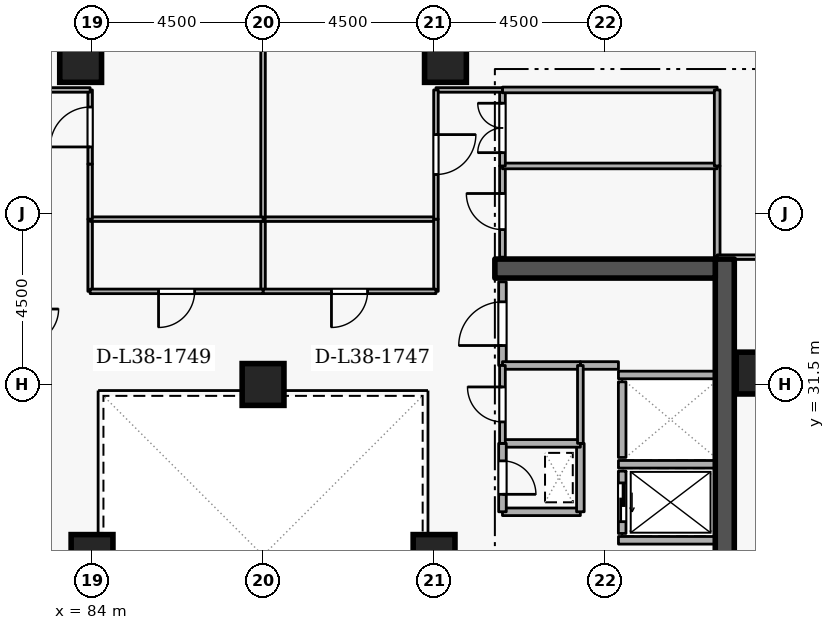
"""IFC4 building model, lengths in metres.
Left out: names, types, materials, properties, quantities, classifications, styles, units other than length and angle.
Written with IfcOpenShell. Run it as: python <this file> out.ifc"""

import sys

from ifc_helpers import new_model, si_unit, direction, frame, frame_2d, origin, origin_2d, place, context, subcontext, project, spatial, rectangle, extrude, element, fill, save


model = new_model("IFC4")
c1 = context("Model", 3, precision=1e-05, world=origin(), true_north=direction((0.0, 1.0)))
c2 = subcontext(c1, "Body", "Model", "MODEL_VIEW")
j1 = project(units=[si_unit("LENGTHUNIT", "METRE"), si_unit("PLANEANGLEUNIT", "RADIAN")], contexts=[c1])
p1 = place(None, origin())
s1 = spatial("IfcSite", under=j1, at=p1, CompositionType="ELEMENT")
p2 = place(p1, origin())
s2 = spatial("IfcBuilding", under=s1, at=p2, CompositionType="ELEMENT")
p3 = place(p2, frame((0.0, 0.0, 145.5)))
s3 = spatial("IfcBuildingStorey", under=s2, at=p3, CompositionType="ELEMENT", Elevation=145.5)
p4 = place(p3, frame((100.65, 19.2, 0.0), z_axis=(0.0, 0.0, 1.0), x_axis=(0.0, 1.0, 0.0)))
e1 = element("IfcWall", 1, at=p4, inside=s3, PredefinedType="SHEAR", context=c2, shape_type="SweptSolid", body=[
    extrude(rectangle(XDim=15.6, YDim=0.5, at=frame_2d((7.8, 0.0))), origin(), (0.0, 0.0, 1.0), 3.6),
])
p5 = place(p3, frame((94.6, 34.55, 0.0), z_axis=(0.0, 0.0, 1.0), x_axis=(1.0, 0.0, 0.0)))
e2 = element("IfcWall", 2, at=p5, inside=s3, PredefinedType="SHEAR", context=c2, shape_type="SweptSolid", body=[
    extrude(rectangle(XDim=5.8, YDim=0.5, at=frame_2d((2.9, 0.0))), origin(), (0.0, 0.0, 1.0), 3.6),
])
for number, where, z_axis, x_axis in (
    (3, (93.3, 40.0, 0.0), (0.0, 0.0, 1.0), (1.0, 0.0, 0.0)),
    (4, (83.7, 40.0, 0.0), (0.0, 0.0, 1.0), (1.0, 0.0, 0.0)),
    (5, (101.5, 31.8, 0.0), (0.0, 0.0, 1.0), (1.0, 0.0, 0.0)),
    (6, (93.0, 27.0, 0.0), (0.0, 0.0, 1.0), (1.0, 0.0, 0.0)),
    (7, (84.0, 27.0, 0.0), (0.0, 0.0, 1.0), (1.0, 0.0, 0.0)),
    (8, (88.5, 31.5, 0.0), (0.0, 0.0, 1.0), (1.0, 0.0, 0.0)),
):
    element("IfcColumn", number, at=place(p3, frame(where, z_axis=z_axis, x_axis=x_axis)), inside=s3, PredefinedType="COLUMN", context=c2, shape_type="SweptSolid", body=[
        extrude(rectangle(XDim=1.1, YDim=1.1, at=origin_2d()), origin(), (0.0, 0.0, 1.0), 3.6),
    ])
p6 = place(p3, frame((97.95, 29.22, 0.0), z_axis=(0.0, 0.0, 1.0), x_axis=(0.0, -1.0, 0.0)))
e9 = element("IfcWall", 9, at=p6, inside=s3, PredefinedType="STANDARD", context=c2, shape_type="SweptSolid", body=[
    extrude(rectangle(XDim=1.64, YDim=0.2, at=frame_2d((0.82, 0.0))), origin(), (0.0, 0.0, 1.0), 3.3),
])
p7 = place(p6, frame((0.31, 0.0, 0.0)))
e10 = element("IfcOpeningElement", 10, at=p7, cuts=e9, PredefinedType="OPENING", context=c2, shape_type="SweptSolid", body=[
    extrude(rectangle(XDim=1.02, YDim=2.06, at=frame_2d((0.51, 1.03))), frame((0.0, 0.11, 0.0), z_axis=(0.0, -1.0, 0.0), x_axis=(1.0, 0.0, 0.0)), (0.0, 0.0, 1.0), 0.22),
])
p8 = place(p3, frame((97.95, 31.57, 0.0), z_axis=(0.0, 0.0, 1.0), x_axis=(0.0, -1.0, 0.0)))
e11 = element("IfcWall", 11, at=p8, inside=s3, PredefinedType="STANDARD", context=c2, shape_type="SweptSolid", body=[
    extrude(rectangle(XDim=1.99, YDim=0.2, at=frame_2d((0.995, 0.0))), origin(), (0.0, 0.0, 1.0), 3.3),
])
p9 = place(p3, frame((97.852, 29.4, 0.0), z_axis=(0.0, 0.0, 1.0), x_axis=(1.0, 0.0, 0.0)))
e12 = element("IfcWall", 12, at=p9, inside=s3, PredefinedType="STANDARD", context=c2, shape_type="SweptSolid", body=[
    extrude(rectangle(XDim=2.536, YDim=0.2, at=frame_2d((1.268, 0.0))), origin(), (0.0, 0.0, 1.0), 3.3),
])
p10 = place(p3, frame((97.852, 27.4, 0.0), z_axis=(0.0, 0.0, 1.0), x_axis=(1.0, 0.0, 0.0)))
e13 = element("IfcWall", 13, at=p10, inside=s3, PredefinedType="STANDARD", context=c2, shape_type="SweptSolid", body=[
    extrude(rectangle(XDim=2.536, YDim=0.2, at=frame_2d((1.268, 0.0))), origin(), (0.0, 0.0, 1.0), 1.685),
])
p11 = place(p3, frame((97.852, 31.75, 0.0), z_axis=(0.0, 0.0, 1.0), x_axis=(1.0, 0.0, 0.0)))
e14 = element("IfcWall", 14, at=p11, inside=s3, PredefinedType="STANDARD", context=c2, shape_type="SweptSolid", body=[
    extrude(rectangle(XDim=2.536, YDim=0.2, at=frame_2d((1.268, 0.0))), origin(), (0.0, 0.0, 1.0), 3.3),
])
p12 = place(p3, frame((94.8, 28.15, 0.0), z_axis=(0.0, 0.0, 1.0), x_axis=(1.0, 0.0, 0.0)))
e15 = element("IfcWall", 15, at=p12, inside=s3, PredefinedType="STANDARD", context=c2, shape_type="SweptSolid", body=[
    extrude(rectangle(XDim=2.05, YDim=0.2, at=frame_2d((1.025, 0.0))), origin(), (0.0, 0.0, 1.0), 3.3),
])
p13 = place(p3, frame((96.85, 28.15, 0.0), z_axis=(0.0, 0.0, 1.0), x_axis=(0.0, 1.0, 0.0)))
e16 = element("IfcWall", 16, at=p13, inside=s3, PredefinedType="STANDARD", context=c2, shape_type="SweptSolid", body=[
    extrude(rectangle(XDim=1.8, YDim=0.2, at=frame_2d((0.9, 0.0))), origin(), (0.0, 0.0, 1.0), 3.3),
])
p14 = place(p3, frame((96.85, 29.95, 0.0), z_axis=(0.0, 0.0, 1.0), x_axis=(-1.0, 0.0, 0.0)))
e17 = element("IfcWall", 17, at=p14, inside=s3, PredefinedType="STANDARD", context=c2, shape_type="SweptSolid", body=[
    extrude(rectangle(XDim=2.05, YDim=0.2, at=frame_2d((1.025, 0.0))), origin(), (0.0, 0.0, 1.0), 3.3),
])
p15 = place(p3, frame((94.8, 29.95, 0.0), z_axis=(0.0, 0.0, 1.0), x_axis=(0.0, -1.0, 0.0)))
e18 = element("IfcWall", 18, at=p15, inside=s3, PredefinedType="STANDARD", context=c2, shape_type="SweptSolid", body=[
    extrude(rectangle(XDim=1.8, YDim=0.2, at=frame_2d((0.9, 0.0))), origin(), (0.0, 0.0, 1.0), 3.3),
])
p16 = place(p15, frame((0.46, 0.0, 0.0)))
e19 = element("IfcOpeningElement", 19, at=p16, cuts=e18, PredefinedType="OPENING", context=c2, shape_type="SweptSolid", body=[
    extrude(rectangle(XDim=0.88, YDim=2.04, at=frame_2d((0.44, 1.02))), frame((0.0, 0.11, 0.0), z_axis=(0.0, -1.0, 0.0), x_axis=(1.0, 0.0, 0.0)), (0.0, 0.0, 1.0), 0.22),
])
p17 = place(p3, frame((94.8, 32.0, 0.0), z_axis=(0.0, 0.0, 1.0), x_axis=(0.0, 1.0, 0.0)))
e20 = element("IfcWall", 20, at=p17, inside=s3, PredefinedType="STANDARD", context=c2, shape_type="SweptSolid", body=[
    extrude(rectangle(XDim=2.2, YDim=0.2, at=frame_2d((1.1, 0.0))), origin(), (0.0, 0.0, 1.0), 3.3),
])
p18 = place(p17, frame((0.525, 0.0, 0.0)))
e21 = element("IfcOpeningElement", 21, at=p18, cuts=e20, PredefinedType="OPENING", context=c2, shape_type="SweptSolid", body=[
    extrude(rectangle(XDim=1.15, YDim=2.1, at=frame_2d((0.575, 1.05))), frame((0.0, 0.11, 0.0), z_axis=(0.0, -1.0, 0.0), x_axis=(1.0, 0.0, 0.0)), (0.0, 0.0, 1.0), 0.22),
])
p19 = place(p3, frame((97.852, 32.0, 0.0), z_axis=(0.0, 0.0, 1.0), x_axis=(-1.0, 0.0, 0.0)))
e22 = element("IfcWall", 22, at=p19, inside=s3, PredefinedType="STANDARD", context=c2, shape_type="SweptSolid", body=[
    extrude(rectangle(XDim=1.002, YDim=0.2, at=frame_2d((0.501, 0.0))), origin(), (0.0, 0.0, 1.0), 3.3),
])
p20 = place(p3, frame((96.85, 32.0, 0.0), z_axis=(0.0, 0.0, 1.0), x_axis=(-1.0, 0.0, 0.0)))
e23 = element("IfcWall", 23, at=p20, inside=s3, PredefinedType="STANDARD", context=c2, shape_type="SweptSolid", body=[
    extrude(rectangle(XDim=2.05, YDim=0.2, at=frame_2d((1.025, 0.0))), origin(), (0.0, 0.0, 1.0), 3.3),
])
p21 = place(p3, frame((94.8, 29.95, 0.0), z_axis=(0.0, 0.0, 1.0), x_axis=(0.0, 1.0, 0.0)))
e24 = element("IfcWall", 24, at=p21, inside=s3, PredefinedType="PARTITIONING", context=c2, shape_type="SweptSolid", body=[
    extrude(rectangle(XDim=2.05, YDim=0.15, at=frame_2d((1.025, 0.0))), origin(), (0.0, 0.0, 1.0), 3.3),
])
p22 = place(p21, frame((0.565, 0.0, 0.0)))
e25 = element("IfcOpeningElement", 25, at=p22, cuts=e24, PredefinedType="OPENING", context=c2, shape_type="SweptSolid", body=[
    extrude(rectangle(XDim=0.92, YDim=2.08, at=frame_2d((0.46, 1.04))), frame((0.0, 0.085, 0.0), z_axis=(0.0, -1.0, 0.0), x_axis=(1.0, 0.0, 0.0)), (0.0, 0.0, 1.0), 0.17),
])
p23 = place(p3, frame((96.85, 32.0, 0.0), z_axis=(0.0, 0.0, 1.0), x_axis=(0.0, -1.0, 0.0)))
e26 = element("IfcWall", 26, at=p23, inside=s3, PredefinedType="PARTITIONING", context=c2, shape_type="SweptSolid", body=[
    extrude(rectangle(XDim=2.05, YDim=0.15, at=frame_2d((1.025, 0.0))), origin(), (0.0, 0.0, 1.0), 3.3),
])
p24 = place(p3, frame((100.45, 37.25, 0.0), z_axis=(0.0, 0.0, 1.0), x_axis=(0.0, -1.0, 0.0)))
e27 = element("IfcWall", 27, at=p24, inside=s3, PredefinedType="PARTITIONING", context=c2, shape_type="SweptSolid", body=[
    extrude(rectangle(XDim=2.4, YDim=0.15, at=frame_2d((1.2, 0.0))), origin(), (0.0, 0.0, 1.0), 3.3),
])
p25 = place(p3, frame((94.8, 34.85, 0.0), z_axis=(0.0, 0.0, 1.0), x_axis=(0.0, 1.0, 0.0)))
e28 = element("IfcWall", 28, at=p25, inside=s3, PredefinedType="PARTITIONING", context=c2, shape_type="SweptSolid", body=[
    extrude(rectangle(XDim=2.4, YDim=0.15, at=frame_2d((1.2, 0.0))), origin(), (0.0, 0.0, 1.0), 3.3),
])
p26 = place(p25, frame((0.725, 0.0, 0.0)))
e29 = element("IfcOpeningElement", 29, at=p26, cuts=e28, PredefinedType="OPENING", context=c2, shape_type="SweptSolid", body=[
    extrude(rectangle(XDim=0.95, YDim=2.1, at=frame_2d((0.475, 1.05))), frame((0.0, 0.085, 0.0), z_axis=(0.0, -1.0, 0.0), x_axis=(1.0, 0.0, 0.0)), (0.0, 0.0, 1.0), 0.17),
])
p27 = place(p3, frame((94.8, 37.25, 0.0), z_axis=(0.0, 0.0, 1.0), x_axis=(1.0, 0.0, 0.0)))
e30 = element("IfcWall", 30, at=p27, inside=s3, PredefinedType="PARTITIONING", context=c2, shape_type="SweptSolid", body=[
    extrude(rectangle(XDim=5.65, YDim=0.15, at=frame_2d((2.825, 0.0))), origin(), (0.0, 0.0, 1.0), 3.3),
])
p28 = place(p3, frame((94.8, 37.25, 0.0), z_axis=(0.0, 0.0, 1.0), x_axis=(0.0, 1.0, 0.0)))
e31 = element("IfcWall", 31, at=p28, inside=s3, PredefinedType="PARTITIONING", context=c2, shape_type="SweptSolid", body=[
    extrude(rectangle(XDim=2.0, YDim=0.15, at=frame_2d((1.0, 0.0))), origin(), (0.0, 0.0, 1.0), 3.3),
])
p29 = place(p28, frame((0.35, 0.0, 0.0)))
e32 = element("IfcOpeningElement", 32, at=p29, cuts=e31, PredefinedType="OPENING", context=c2, shape_type="SweptSolid", body=[
    extrude(rectangle(XDim=1.3, YDim=2.12, at=frame_2d((0.65, 1.06))), frame((0.0, 0.085, 0.0), z_axis=(0.0, -1.0, 0.0), x_axis=(1.0, 0.0, 0.0)), (0.0, 0.0, 1.0), 0.17),
])
p30 = place(p3, frame((94.8, 39.25, 0.0), z_axis=(0.0, 0.0, 1.0), x_axis=(1.0, 0.0, 0.0)))
e33 = element("IfcWall", 33, at=p30, inside=s3, PredefinedType="PARTITIONING", context=c2, shape_type="SweptSolid", body=[
    extrude(rectangle(XDim=5.65, YDim=0.15, at=frame_2d((2.825, 0.0))), origin(), (0.0, 0.0, 1.0), 3.3),
])
p31 = place(p3, frame((100.45, 39.25, 0.0), z_axis=(0.0, 0.0, 1.0), x_axis=(0.0, -1.0, 0.0)))
e34 = element("IfcWall", 34, at=p31, inside=s3, PredefinedType="PARTITIONING", context=c2, shape_type="SweptSolid", body=[
    extrude(rectangle(XDim=2.0, YDim=0.15, at=frame_2d((1.0, 0.0))), origin(), (0.0, 0.0, 1.0), 3.3),
])
p32 = place(p3, frame((88.5, 33.95, 0.0), z_axis=(0.0, 0.0, 1.0), x_axis=(0.0, 1.0, 0.0)))
e35 = element("IfcWall", 35, at=p32, inside=s3, PredefinedType="PARTITIONING", context=c2, shape_type="SweptSolid", body=[
    extrude(rectangle(XDim=1.9, YDim=0.12, at=frame_2d((0.95, 0.0))), origin(), (0.0, 0.0, 1.0), 1.685),
])
p33 = place(p3, frame((88.5, 35.85, 0.0), z_axis=(0.0, 0.0, 1.0), x_axis=(1.0, 0.0, 0.0)))
e36 = element("IfcWall", 36, at=p33, inside=s3, PredefinedType="PARTITIONING", context=c2, shape_type="SweptSolid", body=[
    extrude(rectangle(XDim=4.55, YDim=0.12, at=frame_2d((2.275, 0.0))), origin(), (0.0, 0.0, 1.0), 3.3),
])
p34 = place(p3, frame((93.05, 35.85, 0.0), z_axis=(0.0, 0.0, 1.0), x_axis=(0.0, -1.0, 0.0)))
e37 = element("IfcWall", 37, at=p34, inside=s3, PredefinedType="PARTITIONING", context=c2, shape_type="SweptSolid", body=[
    extrude(rectangle(XDim=1.9, YDim=0.12, at=frame_2d((0.95, 0.0))), origin(), (0.0, 0.0, 1.0), 3.3),
])
p35 = place(p3, frame((93.05, 33.95, 0.0), z_axis=(0.0, 0.0, 1.0), x_axis=(-1.0, 0.0, 0.0)))
e38 = element("IfcWall", 38, at=p35, inside=s3, PredefinedType="PARTITIONING", context=c2, shape_type="SweptSolid", body=[
    extrude(rectangle(XDim=4.55, YDim=0.12, at=frame_2d((2.275, 0.0))), origin(), (0.0, 0.0, 1.0), 3.3),
])
p36 = place(p35, frame((1.8, 0.0, 0.0)))
e39 = element("IfcOpeningElement", 39, at=p36, cuts=e38, PredefinedType="OPENING", context=c2, shape_type="SweptSolid", body=[
    extrude(rectangle(XDim=0.95, YDim=2.1, at=frame_2d((0.475, 1.05))), frame((0.0, 0.07, 0.0), z_axis=(0.0, -1.0, 0.0), x_axis=(1.0, 0.0, 0.0)), (0.0, 0.0, 1.0), 0.14),
])
p37 = place(p3, frame((94.8, 39.25, 0.0), z_axis=(0.0, 0.0, 1.0), x_axis=(-1.0, 0.0, 0.0)))
e40 = element("IfcWall", 40, at=p37, inside=s3, PredefinedType="PARTITIONING", context=c2, shape_type="SweptSolid", body=[
    extrude(rectangle(XDim=1.75, YDim=0.12, at=frame_2d((0.875, 0.0))), origin(), (0.0, 0.0, 1.0), 3.3),
])
p38 = place(p3, frame((93.05, 39.25, 0.0), z_axis=(0.0, 0.0, 1.0), x_axis=(0.0, -1.0, 0.0)))
e41 = element("IfcWall", 41, at=p38, inside=s3, PredefinedType="PARTITIONING", context=c2, shape_type="SweptSolid", body=[
    extrude(rectangle(XDim=3.4, YDim=0.12, at=frame_2d((1.7, 0.0))), origin(), (0.0, 0.0, 1.0), 3.3),
])
p39 = place(p38, frame((1.175, 0.0, 0.0)))
e42 = element("IfcOpeningElement", 42, at=p39, cuts=e41, PredefinedType="OPENING", context=c2, shape_type="SweptSolid", body=[
    extrude(rectangle(XDim=1.05, YDim=2.1, at=frame_2d((0.525, 1.05))), frame((0.0, 0.07, 0.0), z_axis=(0.0, -1.0, 0.0), x_axis=(1.0, 0.0, 0.0)), (0.0, 0.0, 1.0), 0.14),
])
p40 = place(p3, frame((88.5, 35.85, 0.0), z_axis=(0.0, 0.0, 1.0), x_axis=(0.0, 1.0, 0.0)))
e43 = element("IfcWall", 43, at=p40, inside=s3, PredefinedType="PARTITIONING", context=c2, shape_type="SweptSolid", body=[
    extrude(rectangle(XDim=8.87, YDim=0.12, at=frame_2d((4.435, 0.0))), origin(), (0.0, 0.0, 1.0), 1.685),
])
p41 = place(p3, frame((112.22, 34.85, 0.0), z_axis=(0.0, 0.0, 1.0), x_axis=(-1.0, 0.0, 0.0)))
e44 = element("IfcWall", 44, at=p41, inside=s3, PredefinedType="PARTITIONING", context=c2, shape_type="SweptSolid", body=[
    extrude(rectangle(XDim=11.77, YDim=0.12, at=frame_2d((5.885, 0.0))), origin(), (0.0, 0.0, 1.0), 2.505),
])
p42 = place(p3, frame((83.95, 33.95, 0.0), z_axis=(0.0, 0.0, 1.0), x_axis=(0.0, 1.0, 0.0)))
e45 = element("IfcWall", 45, at=p42, inside=s3, PredefinedType="PARTITIONING", context=c2, shape_type="SweptSolid", body=[
    extrude(rectangle(XDim=1.9, YDim=0.12, at=frame_2d((0.95, 0.0))), origin(), (0.0, 0.0, 1.0), 3.3),
])
p43 = place(p3, frame((83.95, 35.85, 0.0), z_axis=(0.0, 0.0, 1.0), x_axis=(1.0, 0.0, 0.0)))
e46 = element("IfcWall", 46, at=p43, inside=s3, PredefinedType="PARTITIONING", context=c2, shape_type="SweptSolid", body=[
    extrude(rectangle(XDim=4.55, YDim=0.12, at=frame_2d((2.275, 0.0))), origin(), (0.0, 0.0, 1.0), 3.3),
])
p44 = place(p3, frame((88.5, 33.95, 0.0), z_axis=(0.0, 0.0, 1.0), x_axis=(-1.0, 0.0, 0.0)))
e47 = element("IfcWall", 47, at=p44, inside=s3, PredefinedType="PARTITIONING", context=c2, shape_type="SweptSolid", body=[
    extrude(rectangle(XDim=4.55, YDim=0.12, at=frame_2d((2.275, 0.0))), origin(), (0.0, 0.0, 1.0), 3.3),
])
p45 = place(p44, frame((1.8, 0.0, 0.0)))
e48 = element("IfcOpeningElement", 48, at=p45, cuts=e47, PredefinedType="OPENING", context=c2, shape_type="SweptSolid", body=[
    extrude(rectangle(XDim=0.95, YDim=2.1, at=frame_2d((0.475, 1.05))), frame((0.0, 0.07, 0.0), z_axis=(0.0, -1.0, 0.0), x_axis=(1.0, 0.0, 0.0)), (0.0, 0.0, 1.0), 0.14),
])
p46 = place(p3, frame((83.95, 35.85, 0.0), z_axis=(0.0, 0.0, 1.0), x_axis=(0.0, 1.0, 0.0)))
e49 = element("IfcWall", 49, at=p46, inside=s3, PredefinedType="PARTITIONING", context=c2, shape_type="SweptSolid", body=[
    extrude(rectangle(XDim=1.45, YDim=0.12, at=frame_2d((0.725, 0.0))), origin(), (0.0, 0.0, 1.0), 3.3),
])
p47 = place(p3, frame((83.95, 37.3, 0.0), z_axis=(0.0, 0.0, 1.0), x_axis=(0.0, 1.0, 0.0)))
e50 = element("IfcWall", 50, at=p47, inside=s3, PredefinedType="PARTITIONING", context=c2, shape_type="SweptSolid", body=[
    extrude(rectangle(XDim=1.95, YDim=0.12, at=frame_2d((0.975, 0.0))), origin(), (0.0, 0.0, 1.0), 3.3),
])
p48 = place(p47, frame((0.45, 0.0, 0.0)))
e51 = element("IfcOpeningElement", 51, at=p48, cuts=e50, PredefinedType="OPENING", context=c2, shape_type="SweptSolid", body=[
    extrude(rectangle(XDim=1.05, YDim=2.1, at=frame_2d((0.525, 1.05))), frame((0.0, 0.07, 0.0), z_axis=(0.0, -1.0, 0.0), x_axis=(1.0, 0.0, 0.0)), (0.0, 0.0, 1.0), 0.14),
])
p49 = place(p3, frame((83.95, 39.25, 0.0), z_axis=(0.0, 0.0, 1.0), x_axis=(-1.0, 0.0, 0.0)))
e52 = element("IfcWall", 52, at=p49, inside=s3, PredefinedType="PARTITIONING", context=c2, shape_type="SweptSolid", body=[
    extrude(rectangle(XDim=1.75, YDim=0.12, at=frame_2d((0.875, 0.0))), origin(), (0.0, 0.0, 1.0), 3.3),
])
p50 = place(p7, origin())
e53 = element("IfcDoor", 53, at=p50, inside=s3, OperationType="SLIDING_TO_LEFT", PredefinedType="DOOR", context=c2, shape_type="SweptSolid", body=[
    extrude(rectangle(XDim=1.02, YDim=2.06, at=frame_2d((0.51, 1.03))), frame((0.0, 0.025, 0.0), z_axis=(0.0, -1.0, 0.0), x_axis=(1.0, 0.0, 0.0)), (0.0, 0.0, 1.0), 0.05),
])
fill(e10, e53)
p51 = place(p16, origin())
e54 = element("IfcDoor", 54, at=p51, inside=s3, OperationType="SINGLE_SWING_RIGHT", PredefinedType="DOOR", context=c2, shape_type="SweptSolid", body=[
    extrude(rectangle(XDim=0.88, YDim=2.04, at=frame_2d((0.44, 1.02))), frame((0.0, 0.025, 0.0), z_axis=(0.0, -1.0, 0.0), x_axis=(1.0, 0.0, 0.0)), (0.0, 0.0, 1.0), 0.05),
])
fill(e19, e54)
p52 = place(p22, origin())
e55 = element("IfcDoor", 55, at=p52, inside=s3, OperationType="SINGLE_SWING_RIGHT", PredefinedType="DOOR", context=c2, shape_type="SweptSolid", body=[
    extrude(rectangle(XDim=0.92, YDim=2.08, at=frame_2d((0.46, 1.04))), frame((0.0, 0.025, 0.0), z_axis=(0.0, -1.0, 0.0), x_axis=(1.0, 0.0, 0.0)), (0.0, 0.0, 1.0), 0.05),
])
fill(e25, e55)
p53 = place(p18, origin())
e56 = element("IfcDoor", 56, at=p53, inside=s3, OperationType="SINGLE_SWING_LEFT", PredefinedType="DOOR", context=c2, shape_type="SweptSolid", body=[
    extrude(rectangle(XDim=1.15, YDim=2.1, at=frame_2d((0.575, 1.05))), frame((0.0, 0.025, 0.0), z_axis=(0.0, -1.0, 0.0), x_axis=(1.0, 0.0, 0.0)), (0.0, 0.0, 1.0), 0.05),
])
fill(e21, e56)
p54 = place(p26, origin())
e57 = element("IfcDoor", 57, at=p54, inside=s3, OperationType="SINGLE_SWING_RIGHT", PredefinedType="DOOR", context=c2, shape_type="SweptSolid", body=[
    extrude(rectangle(XDim=0.95, YDim=2.1, at=frame_2d((0.475, 1.05))), frame((0.0, 0.025, 0.0), z_axis=(0.0, -1.0, 0.0), x_axis=(1.0, 0.0, 0.0)), (0.0, 0.0, 1.0), 0.05),
])
fill(e29, e57)
p55 = place(p29, origin())
e58 = element("IfcDoor", 58, at=p55, inside=s3, OperationType="DOUBLE_DOOR_SINGLE_SWING", PredefinedType="DOOR", context=c2, shape_type="SweptSolid", body=[
    extrude(rectangle(XDim=1.3, YDim=2.12, at=frame_2d((0.65, 1.06))), frame((0.0, 0.025, 0.0), z_axis=(0.0, -1.0, 0.0), x_axis=(1.0, 0.0, 0.0)), (0.0, 0.0, 1.0), 0.05),
])
fill(e32, e58)
p56 = place(p36, origin())
e59 = element("IfcDoor", 59, at=p56, inside=s3, OperationType="SINGLE_SWING_RIGHT", PredefinedType="DOOR", context=c2, shape_type="SweptSolid", body=[
    extrude(rectangle(XDim=0.95, YDim=2.1, at=frame_2d((0.475, 1.05))), frame((0.0, 0.025, 0.0), z_axis=(0.0, -1.0, 0.0), x_axis=(1.0, 0.0, 0.0)), (0.0, 0.0, 1.0), 0.05),
])
fill(e39, e59)
p57 = place(p39, origin())
e60 = element("IfcDoor", 60, at=p57, inside=s3, OperationType="SINGLE_SWING_LEFT", PredefinedType="DOOR", context=c2, shape_type="SweptSolid", body=[
    extrude(rectangle(XDim=1.05, YDim=2.1, at=frame_2d((0.525, 1.05))), frame((0.0, 0.025, 0.0), z_axis=(0.0, -1.0, 0.0), x_axis=(1.0, 0.0, 0.0)), (0.0, 0.0, 1.0), 0.05),
])
fill(e42, e60)
p58 = place(p45, origin())
e61 = element("IfcDoor", 61, at=p58, inside=s3, OperationType="SINGLE_SWING_RIGHT", PredefinedType="DOOR", context=c2, shape_type="SweptSolid", body=[
    extrude(rectangle(XDim=0.95, YDim=2.1, at=frame_2d((0.475, 1.05))), frame((0.0, 0.025, 0.0), z_axis=(0.0, -1.0, 0.0), x_axis=(1.0, 0.0, 0.0)), (0.0, 0.0, 1.0), 0.05),
])
fill(e48, e61)
p59 = place(p48, origin())
e62 = element("IfcDoor", 62, at=p59, inside=s3, OperationType="SINGLE_SWING_LEFT", PredefinedType="DOOR", context=c2, shape_type="SweptSolid", body=[
    extrude(rectangle(XDim=1.05, YDim=2.1, at=frame_2d((0.525, 1.05))), frame((0.0, 0.025, 0.0), z_axis=(0.0, -1.0, 0.0), x_axis=(1.0, 0.0, 0.0)), (0.0, 0.0, 1.0), 0.05),
])
fill(e51, e62)
save(model, sys.argv[1])
